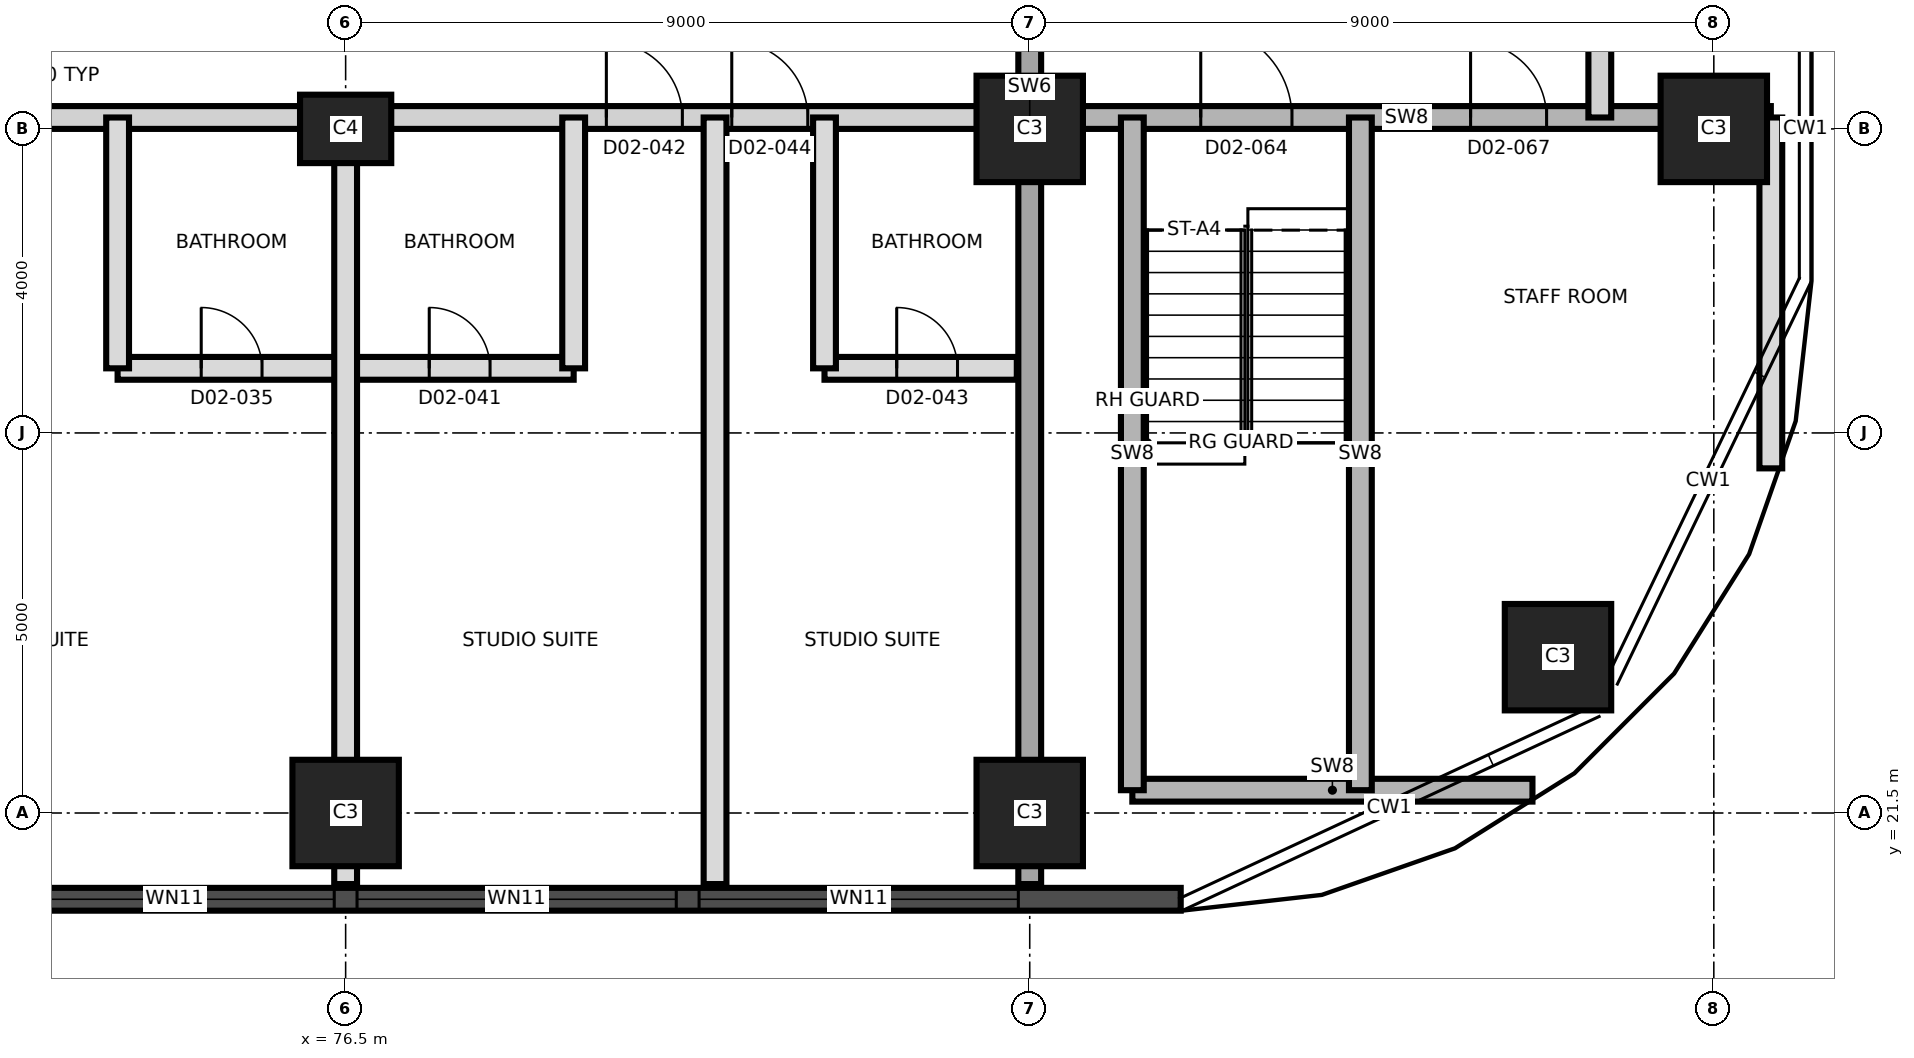
"""IFC4 building model, lengths in metres.
Left out: names, types, materials, properties, quantities, classifications, styles, units other than length and angle.
Written with IfcOpenShell. Run it as: python <this file> out.ifc"""

import sys

from ifc_helpers import new_model, si_unit, direction, frame, frame_2d, origin, origin_2d, place, context, subcontext, project, spatial, rectangle, extrude, element, fill, save


model = new_model("IFC4")
c1 = context("Model", 3, precision=1e-05, world=origin(), true_north=direction((0.0, 1.0)))
c2 = subcontext(c1, "Body", "Model", "MODEL_VIEW")
j1 = project(units=[si_unit("LENGTHUNIT", "METRE"), si_unit("PLANEANGLEUNIT", "RADIAN")], contexts=[c1])
p1 = place(None, origin())
s1 = spatial("IfcSite", under=j1, at=p1, CompositionType="ELEMENT")
p2 = place(p1, origin())
s2 = spatial("IfcBuilding", under=s1, at=p2, CompositionType="ELEMENT")
p3 = place(p2, frame((0.0, 0.0, 44.6)))
s3 = spatial("IfcBuildingStorey", under=s2, at=p3, CompositionType="ELEMENT", Elevation=44.6)
for number, where, z_axis, x_axis in (
    (1, (76.5, 21.5, 0.0), (0.0, 0.0, 1.0), (1.0, 0.0, 0.0)),
    (2, (85.5, 21.5, 0.0), (0.0, 0.0, 1.0), (1.0, 0.0, 0.0)),
    (3, (92.45, 23.55, 0.0), (0.0, 0.0, 1.0), (1.0, 0.0, 0.0)),
):
    element("IfcColumn", number, at=place(p3, frame(where, z_axis=z_axis, x_axis=x_axis)), inside=s3, PredefinedType="COLUMN", context=c2, shape_type="SweptSolid", body=[
        extrude(rectangle(XDim=1.4, YDim=1.4, at=origin_2d()), origin(), (0.0, 0.0, 1.0), 3.7),
    ])
p4 = place(p3, frame((76.5, 30.5, 0.0), z_axis=(0.0, 0.0, 1.0), x_axis=(1.0, 0.0, 0.0)))
e4 = element("IfcColumn", 4, at=p4, inside=s3, PredefinedType="COLUMN", context=c2, shape_type="SweptSolid", body=[
    extrude(rectangle(XDim=1.2, YDim=0.9, at=origin_2d()), origin(), (0.0, 0.0, 1.0), 3.7),
])
for number, where, z_axis, x_axis in (
    (5, (85.5, 30.5, 0.0), (0.0, 0.0, 1.0), (1.0, 0.0, 0.0)),
    (6, (94.5, 30.5, 0.0), (0.0, 0.0, 1.0), (1.0, 0.0, 0.0)),
):
    element("IfcColumn", number, at=place(p3, frame(where, z_axis=z_axis, x_axis=x_axis)), inside=s3, PredefinedType="COLUMN", context=c2, shape_type="SweptSolid", body=[
        extrude(rectangle(XDim=1.4, YDim=1.4, at=origin_2d()), origin(), (0.0, 0.0, 1.0), 3.7),
    ])
p5 = place(p3, frame((85.5, 20.565, 0.0), z_axis=(0.0, 0.0, 1.0), x_axis=(0.0, 1.0, 0.0)))
e7 = element("IfcWall", 7, at=p5, inside=s3, PredefinedType="SHEAR", context=c2, shape_type="SweptSolid", body=[
    extrude(rectangle(XDim=19.87, YDim=0.3, at=frame_2d((9.935, 0.0))), origin(), (0.0, 0.0, 1.0), 3.7),
])
p6 = place(p5, frame((11.135, 0.0, 0.0)))
e8 = element("IfcOpeningElement", 8, at=p6, cuts=e7, PredefinedType="OPENING", context=c2, shape_type="SweptSolid", body=[
    extrude(rectangle(XDim=1.4, YDim=2.1, at=frame_2d((0.7, 1.05))), frame((0.0, 0.16, 0.0), z_axis=(0.0, -1.0, 0.0), x_axis=(1.0, 0.0, 0.0)), (0.0, 0.0, 1.0), 0.32),
])
p7 = place(p3, frame((44.021, 20.365, 0.0), z_axis=(0.0, 0.0, 1.0), x_axis=(1.0, 0.0, 0.0)))
e9 = element("IfcWall", 9, at=p7, inside=s3, PredefinedType="SOLIDWALL", context=c2, shape_type="SweptSolid", body=[
    extrude(rectangle(XDim=43.466, YDim=0.3, at=frame_2d((21.733, 0.0))), origin(), (0.0, 0.0, 1.0), 3.4),
])
p8 = place(p7, frame((1.84, 0.0, 0.3)))
e10 = element("IfcOpeningElement", 10, at=p8, cuts=e9, PredefinedType="OPENING", context=c2, shape_type="SweptSolid", body=[
    extrude(rectangle(XDim=1.8, YDim=2.4, at=frame_2d((0.9, 1.2))), frame((0.0, 0.16, 0.0), z_axis=(0.0, -1.0, 0.0), x_axis=(1.0, 0.0, 0.0)), (0.0, 0.0, 1.0), 0.32),
])
p9 = place(p7, frame((5.63, 0.0, 0.9)))
e11 = element("IfcOpeningElement", 11, at=p9, cuts=e9, PredefinedType="OPENING", context=c2, shape_type="SweptSolid", body=[
    extrude(rectangle(XDim=4.2, YDim=1.5, at=frame_2d((2.1, 0.75))), frame((0.0, 0.16, 0.0), z_axis=(0.0, -1.0, 0.0), x_axis=(1.0, 0.0, 0.0)), (0.0, 0.0, 1.0), 0.32),
])
p10 = place(p7, frame((10.13, 0.0, 0.9)))
e12 = element("IfcOpeningElement", 12, at=p10, cuts=e9, PredefinedType="OPENING", context=c2, shape_type="SweptSolid", body=[
    extrude(rectangle(XDim=4.2, YDim=1.5, at=frame_2d((2.1, 0.75))), frame((0.0, 0.16, 0.0), z_axis=(0.0, -1.0, 0.0), x_axis=(1.0, 0.0, 0.0)), (0.0, 0.0, 1.0), 0.32),
])
p11 = place(p7, frame((14.63, 0.0, 0.9)))
e13 = element("IfcOpeningElement", 13, at=p11, cuts=e9, PredefinedType="OPENING", context=c2, shape_type="SweptSolid", body=[
    extrude(rectangle(XDim=4.2, YDim=1.5, at=frame_2d((2.1, 0.75))), frame((0.0, 0.16, 0.0), z_axis=(0.0, -1.0, 0.0), x_axis=(1.0, 0.0, 0.0)), (0.0, 0.0, 1.0), 0.32),
])
p12 = place(p7, frame((19.13, 0.0, 0.9)))
e14 = element("IfcOpeningElement", 14, at=p12, cuts=e9, PredefinedType="OPENING", context=c2, shape_type="SweptSolid", body=[
    extrude(rectangle(XDim=4.2, YDim=1.5, at=frame_2d((2.1, 0.75))), frame((0.0, 0.16, 0.0), z_axis=(0.0, -1.0, 0.0), x_axis=(1.0, 0.0, 0.0)), (0.0, 0.0, 1.0), 0.32),
])
p13 = place(p7, frame((23.63, 0.0, 0.9)))
e15 = element("IfcOpeningElement", 15, at=p13, cuts=e9, PredefinedType="OPENING", context=c2, shape_type="SweptSolid", body=[
    extrude(rectangle(XDim=4.2, YDim=1.5, at=frame_2d((2.1, 0.75))), frame((0.0, 0.16, 0.0), z_axis=(0.0, -1.0, 0.0), x_axis=(1.0, 0.0, 0.0)), (0.0, 0.0, 1.0), 0.32),
])
p14 = place(p7, frame((28.13, 0.0, 0.9)))
e16 = element("IfcOpeningElement", 16, at=p14, cuts=e9, PredefinedType="OPENING", context=c2, shape_type="SweptSolid", body=[
    extrude(rectangle(XDim=4.2, YDim=1.5, at=frame_2d((2.1, 0.75))), frame((0.0, 0.16, 0.0), z_axis=(0.0, -1.0, 0.0), x_axis=(1.0, 0.0, 0.0)), (0.0, 0.0, 1.0), 0.32),
])
p15 = place(p7, frame((32.63, 0.0, 0.9)))
e17 = element("IfcOpeningElement", 17, at=p15, cuts=e9, PredefinedType="OPENING", context=c2, shape_type="SweptSolid", body=[
    extrude(rectangle(XDim=4.2, YDim=1.5, at=frame_2d((2.1, 0.75))), frame((0.0, 0.16, 0.0), z_axis=(0.0, -1.0, 0.0), x_axis=(1.0, 0.0, 0.0)), (0.0, 0.0, 1.0), 0.32),
])
p16 = place(p7, frame((37.13, 0.0, 0.9)))
e18 = element("IfcOpeningElement", 18, at=p16, cuts=e9, PredefinedType="OPENING", context=c2, shape_type="SweptSolid", body=[
    extrude(rectangle(XDim=4.2, YDim=1.5, at=frame_2d((2.1, 0.75))), frame((0.0, 0.16, 0.0), z_axis=(0.0, -1.0, 0.0), x_axis=(1.0, 0.0, 0.0)), (0.0, 0.0, 1.0), 0.32),
])
p17 = place(p3, frame((86.85, 21.8, 0.0), z_axis=(0.0, 0.0, 1.0), x_axis=(1.0, 0.0, 0.0)))
e19 = element("IfcWall", 19, at=p17, inside=s3, PredefinedType="SHEAR", context=c2, shape_type="SweptSolid", body=[
    extrude(rectangle(XDim=5.264, YDim=0.3, at=frame_2d((2.632, 0.0))), origin(), (0.0, 0.0, 1.0), 3.4),
])
p18 = place(p3, frame((73.5, 27.35, 0.0), z_axis=(0.0, 0.0, 1.0), x_axis=(1.0, 0.0, 0.0)))
e20 = element("IfcWall", 20, at=p18, inside=s3, PredefinedType="PARTITIONING", context=c2, shape_type="SweptSolid", body=[
    extrude(rectangle(XDim=6.0, YDim=0.3, at=frame_2d((3.0, 0.0))), origin(), (0.0, 0.0, 1.0), 3.4),
])
p19 = place(p18, frame((1.1, 0.0, 0.0)))
e21 = element("IfcOpeningElement", 21, at=p19, cuts=e20, PredefinedType="OPENING", context=c2, shape_type="SweptSolid", body=[
    extrude(rectangle(XDim=0.8, YDim=2.1, at=frame_2d((0.4, 1.05))), frame((0.0, 0.16, 0.0), z_axis=(0.0, -1.0, 0.0), x_axis=(1.0, 0.0, 0.0)), (0.0, 0.0, 1.0), 0.32),
])
p20 = place(p18, frame((4.1, 0.0, 0.0)))
e22 = element("IfcOpeningElement", 22, at=p20, cuts=e20, PredefinedType="OPENING", context=c2, shape_type="SweptSolid", body=[
    extrude(rectangle(XDim=0.8, YDim=2.1, at=frame_2d((0.4, 1.05))), frame((0.0, 0.16, 0.0), z_axis=(0.0, -1.0, 0.0), x_axis=(1.0, 0.0, 0.0)), (0.0, 0.0, 1.0), 0.32),
])
p21 = place(p3, frame((82.8, 27.35, 0.0), z_axis=(0.0, 0.0, 1.0), x_axis=(1.0, 0.0, 0.0)))
e23 = element("IfcWall", 23, at=p21, inside=s3, PredefinedType="PARTITIONING", context=c2, shape_type="SweptSolid", body=[
    extrude(rectangle(XDim=2.53, YDim=0.3, at=frame_2d((1.265, 0.0))), origin(), (0.0, 0.0, 1.0), 3.4),
])
p22 = place(p21, frame((0.95, 0.0, 0.0)))
e24 = element("IfcOpeningElement", 24, at=p22, cuts=e23, PredefinedType="OPENING", context=c2, shape_type="SweptSolid", body=[
    extrude(rectangle(XDim=0.8, YDim=2.1, at=frame_2d((0.4, 1.05))), frame((0.0, 0.16, 0.0), z_axis=(0.0, -1.0, 0.0), x_axis=(1.0, 0.0, 0.0)), (0.0, 0.0, 1.0), 0.32),
])
p23 = place(p3, frame((58.95, 30.65, 0.0), z_axis=(0.0, 0.0, 1.0), x_axis=(1.0, 0.0, 0.0)))
e25 = element("IfcWall", 25, at=p23, inside=s3, PredefinedType="PARTITIONING", context=c2, shape_type="SweptSolid", body=[
    extrude(rectangle(XDim=26.38, YDim=0.3, at=frame_2d((13.19, 0.0))), origin(), (0.0, 0.0, 1.0), 3.4),
])
p24 = place(p23, frame((0.685, 0.0, 0.0)))
e26 = element("IfcOpeningElement", 26, at=p24, cuts=e25, PredefinedType="OPENING", context=c2, shape_type="SweptSolid", body=[
    extrude(rectangle(XDim=1.2, YDim=2.1, at=frame_2d((0.6, 1.05))), frame((0.0, 0.16, 0.0), z_axis=(0.0, -1.0, 0.0), x_axis=(1.0, 0.0, 0.0)), (0.0, 0.0, 1.0), 0.32),
])
p25 = place(p23, frame((3.935, 0.0, 0.0)))
e27 = element("IfcOpeningElement", 27, at=p25, cuts=e25, PredefinedType="OPENING", context=c2, shape_type="SweptSolid", body=[
    extrude(rectangle(XDim=1.0, YDim=2.1, at=frame_2d((0.5, 1.05))), frame((0.0, 0.16, 0.0), z_axis=(0.0, -1.0, 0.0), x_axis=(1.0, 0.0, 0.0)), (0.0, 0.0, 1.0), 0.32),
])
p26 = place(p23, frame((12.55, 0.0, 0.0)))
e28 = element("IfcOpeningElement", 28, at=p26, cuts=e25, PredefinedType="OPENING", context=c2, shape_type="SweptSolid", body=[
    extrude(rectangle(XDim=1.0, YDim=2.4, at=frame_2d((0.5, 1.2))), frame((0.0, 0.16, 0.0), z_axis=(0.0, -1.0, 0.0), x_axis=(1.0, 0.0, 0.0)), (0.0, 0.0, 1.0), 0.32),
])
p27 = place(p23, frame((20.98, 0.0, 0.0)))
e29 = element("IfcOpeningElement", 29, at=p27, cuts=e25, PredefinedType="OPENING", context=c2, shape_type="SweptSolid", body=[
    extrude(rectangle(XDim=1.0, YDim=2.4, at=frame_2d((0.5, 1.2))), frame((0.0, 0.16, 0.0), z_axis=(0.0, -1.0, 0.0), x_axis=(1.0, 0.0, 0.0)), (0.0, 0.0, 1.0), 0.32),
])
p28 = place(p23, frame((22.63, 0.0, 0.0)))
e30 = element("IfcOpeningElement", 30, at=p28, cuts=e25, PredefinedType="OPENING", context=c2, shape_type="SweptSolid", body=[
    extrude(rectangle(XDim=1.0, YDim=2.4, at=frame_2d((0.5, 1.2))), frame((0.0, 0.16, 0.0), z_axis=(0.0, -1.0, 0.0), x_axis=(1.0, 0.0, 0.0)), (0.0, 0.0, 1.0), 0.32),
])
p29 = place(p3, frame((85.67, 30.65, 0.0), z_axis=(0.0, 0.0, 1.0), x_axis=(1.0, 0.0, 0.0)))
e31 = element("IfcWall", 31, at=p29, inside=s3, PredefinedType="SHEAR", context=c2, shape_type="SweptSolid", body=[
    extrude(rectangle(XDim=9.58, YDim=0.3, at=frame_2d((4.79, 0.0))), origin(), (0.0, 0.0, 1.0), 3.4),
])
p30 = place(p29, frame((2.08, 0.0, 0.0)))
e32 = element("IfcOpeningElement", 32, at=p30, cuts=e31, PredefinedType="OPENING", context=c2, shape_type="SweptSolid", body=[
    extrude(rectangle(XDim=1.2, YDim=2.1, at=frame_2d((0.6, 1.05))), frame((0.0, 0.16, 0.0), z_axis=(0.0, -1.0, 0.0), x_axis=(1.0, 0.0, 0.0)), (0.0, 0.0, 1.0), 0.32),
])
p31 = place(p29, frame((5.63, 0.0, 0.0)))
e33 = element("IfcOpeningElement", 33, at=p31, cuts=e31, PredefinedType="OPENING", context=c2, shape_type="SweptSolid", body=[
    extrude(rectangle(XDim=1.0, YDim=2.1, at=frame_2d((0.5, 1.05))), frame((0.0, 0.16, 0.0), z_axis=(0.0, -1.0, 0.0), x_axis=(1.0, 0.0, 0.0)), (0.0, 0.0, 1.0), 0.32),
])
p32 = place(p3, frame((73.5, 27.35, 0.0), z_axis=(0.0, 0.0, 1.0), x_axis=(0.0, 1.0, 0.0)))
e34 = element("IfcWall", 34, at=p32, inside=s3, PredefinedType="PARTITIONING", context=c2, shape_type="SweptSolid", body=[
    extrude(rectangle(XDim=3.3, YDim=0.3, at=frame_2d((1.65, 0.0))), origin(), (0.0, 0.0, 1.0), 3.4),
])
p33 = place(p3, frame((76.5, 20.565, 0.0), z_axis=(0.0, 0.0, 1.0), x_axis=(0.0, 1.0, 0.0)))
e35 = element("IfcWall", 35, at=p33, inside=s3, PredefinedType="PARTITIONING", context=c2, shape_type="SweptSolid", body=[
    extrude(rectangle(XDim=10.085, YDim=0.3, at=frame_2d((5.042, 0.0))), origin(), (0.0, 0.0, 1.0), 3.4),
])
p34 = place(p3, frame((79.5, 27.35, 0.0), z_axis=(0.0, 0.0, 1.0), x_axis=(0.0, 1.0, 0.0)))
e36 = element("IfcWall", 36, at=p34, inside=s3, PredefinedType="PARTITIONING", context=c2, shape_type="SweptSolid", body=[
    extrude(rectangle(XDim=3.3, YDim=0.3, at=frame_2d((1.65, 0.0))), origin(), (0.0, 0.0, 1.0), 3.4),
])
p35 = place(p3, frame((81.36, 20.565, 0.0), z_axis=(0.0, 0.0, 1.0), x_axis=(0.0, 1.0, 0.0)))
e37 = element("IfcWall", 37, at=p35, inside=s3, PredefinedType="PARTITIONING", context=c2, shape_type="SweptSolid", body=[
    extrude(rectangle(XDim=10.085, YDim=0.3, at=frame_2d((5.042, 0.0))), origin(), (0.0, 0.0, 1.0), 3.4),
])
p36 = place(p3, frame((82.8, 27.35, 0.0), z_axis=(0.0, 0.0, 1.0), x_axis=(0.0, 1.0, 0.0)))
e38 = element("IfcWall", 38, at=p36, inside=s3, PredefinedType="PARTITIONING", context=c2, shape_type="SweptSolid", body=[
    extrude(rectangle(XDim=3.3, YDim=0.3, at=frame_2d((1.65, 0.0))), origin(), (0.0, 0.0, 1.0), 3.4),
])
for number, where, z_axis, x_axis in (
    (39, (86.85, 21.8, 0.0), (0.0, 0.0, 1.0), (0.0, 1.0, 0.0)),
    (40, (89.85, 21.8, 0.0), (0.0, 0.0, 1.0), (0.0, 1.0, 0.0)),
):
    element("IfcWall", number, at=place(p3, frame(where, z_axis=z_axis, x_axis=x_axis)), inside=s3, PredefinedType="SHEAR", context=c2, shape_type="SweptSolid", body=[
        extrude(rectangle(XDim=8.85, YDim=0.3, at=frame_2d((4.425, 0.0))), origin(), (0.0, 0.0, 1.0), 3.4),
    ])
p37 = place(p3, frame((93.0, 30.65, 0.0), z_axis=(0.0, 0.0, 1.0), x_axis=(0.0, 1.0, 0.0)))
e41 = element("IfcWall", 41, at=p37, inside=s3, PredefinedType="PARTITIONING", context=c2, shape_type="SweptSolid", body=[
    extrude(rectangle(XDim=2.7, YDim=0.3, at=frame_2d((1.35, 0.0))), origin(), (0.0, 0.0, 1.0), 3.4),
])
p38 = place(p3, frame((95.25, 26.034, 0.0), z_axis=(0.0, 0.0, 1.0), x_axis=(0.0, 1.0, 0.0)))
e42 = element("IfcWall", 42, at=p38, inside=s3, PredefinedType="PARTITIONING", context=c2, shape_type="SweptSolid", body=[
    extrude(rectangle(XDim=4.616, YDim=0.3, at=frame_2d((2.308, 0.0))), origin(), (0.0, 0.0, 1.0), 3.4),
])
p39 = place(p14, origin())
e43 = element("IfcWindow", 43, at=p39, inside=s3, PartitioningType="SINGLE_PANEL", PredefinedType="WINDOW", context=c2, shape_type="SweptSolid", body=[
    extrude(rectangle(XDim=4.2, YDim=1.5, at=frame_2d((2.1, 0.75))), frame((0.0, 0.03, 0.0), z_axis=(0.0, -1.0, 0.0), x_axis=(1.0, 0.0, 0.0)), (0.0, 0.0, 1.0), 0.06),
])
fill(e16, e43)
p40 = place(p15, origin())
e44 = element("IfcWindow", 44, at=p40, inside=s3, PartitioningType="SINGLE_PANEL", PredefinedType="WINDOW", context=c2, shape_type="SweptSolid", body=[
    extrude(rectangle(XDim=4.2, YDim=1.5, at=frame_2d((2.1, 0.75))), frame((0.0, 0.03, 0.0), z_axis=(0.0, -1.0, 0.0), x_axis=(1.0, 0.0, 0.0)), (0.0, 0.0, 1.0), 0.06),
])
fill(e17, e44)
p41 = place(p16, origin())
e45 = element("IfcWindow", 45, at=p41, inside=s3, PartitioningType="SINGLE_PANEL", PredefinedType="WINDOW", context=c2, shape_type="SweptSolid", body=[
    extrude(rectangle(XDim=4.2, YDim=1.5, at=frame_2d((2.1, 0.75))), frame((0.0, 0.03, 0.0), z_axis=(0.0, -1.0, 0.0), x_axis=(1.0, 0.0, 0.0)), (0.0, 0.0, 1.0), 0.06),
])
fill(e18, e45)
p42 = place(p19, origin())
e46 = element("IfcDoor", 46, at=p42, inside=s3, OperationType="SINGLE_SWING_LEFT", PredefinedType="DOOR", context=c2, shape_type="SweptSolid", body=[
    extrude(rectangle(XDim=0.8, YDim=2.1, at=frame_2d((0.4, 1.05))), frame((0.0, 0.025, 0.0), z_axis=(0.0, -1.0, 0.0), x_axis=(1.0, 0.0, 0.0)), (0.0, 0.0, 1.0), 0.05),
])
fill(e21, e46)
p43 = place(p20, origin())
e47 = element("IfcDoor", 47, at=p43, inside=s3, OperationType="SINGLE_SWING_LEFT", PredefinedType="DOOR", context=c2, shape_type="SweptSolid", body=[
    extrude(rectangle(XDim=0.8, YDim=2.1, at=frame_2d((0.4, 1.05))), frame((0.0, 0.025, 0.0), z_axis=(0.0, -1.0, 0.0), x_axis=(1.0, 0.0, 0.0)), (0.0, 0.0, 1.0), 0.05),
])
fill(e22, e47)
p44 = place(p27, origin())
e48 = element("IfcDoor", 48, at=p44, inside=s3, OperationType="SINGLE_SWING_LEFT", PredefinedType="DOOR", context=c2, shape_type="SweptSolid", body=[
    extrude(rectangle(XDim=1.0, YDim=2.4, at=frame_2d((0.5, 1.2))), frame((0.0, 0.025, 0.0), z_axis=(0.0, -1.0, 0.0), x_axis=(1.0, 0.0, 0.0)), (0.0, 0.0, 1.0), 0.05),
])
fill(e29, e48)
p45 = place(p22, origin())
e49 = element("IfcDoor", 49, at=p45, inside=s3, OperationType="SINGLE_SWING_LEFT", PredefinedType="DOOR", context=c2, shape_type="SweptSolid", body=[
    extrude(rectangle(XDim=0.8, YDim=2.1, at=frame_2d((0.4, 1.05))), frame((0.0, 0.025, 0.0), z_axis=(0.0, -1.0, 0.0), x_axis=(1.0, 0.0, 0.0)), (0.0, 0.0, 1.0), 0.05),
])
fill(e24, e49)
p46 = place(p28, origin())
e50 = element("IfcDoor", 50, at=p46, inside=s3, OperationType="SINGLE_SWING_RIGHT", PredefinedType="DOOR", context=c2, shape_type="SweptSolid", body=[
    extrude(rectangle(XDim=1.0, YDim=2.4, at=frame_2d((0.5, 1.2))), frame((0.0, 0.025, 0.0), z_axis=(0.0, -1.0, 0.0), x_axis=(1.0, 0.0, 0.0)), (0.0, 0.0, 1.0), 0.05),
])
fill(e30, e50)
p47 = place(p30, origin())
e51 = element("IfcDoor", 51, at=p47, inside=s3, OperationType="SINGLE_SWING_LEFT", PredefinedType="DOOR", context=c2, shape_type="SweptSolid", body=[
    extrude(rectangle(XDim=1.2, YDim=2.1, at=frame_2d((0.6, 1.05))), frame((0.0, 0.025, 0.0), z_axis=(0.0, -1.0, 0.0), x_axis=(1.0, 0.0, 0.0)), (0.0, 0.0, 1.0), 0.05),
])
fill(e32, e51)
p48 = place(p31, origin())
e52 = element("IfcDoor", 52, at=p48, inside=s3, OperationType="SINGLE_SWING_LEFT", PredefinedType="DOOR", context=c2, shape_type="SweptSolid", body=[
    extrude(rectangle(XDim=1.0, YDim=2.1, at=frame_2d((0.5, 1.05))), frame((0.0, 0.025, 0.0), z_axis=(0.0, -1.0, 0.0), x_axis=(1.0, 0.0, 0.0)), (0.0, 0.0, 1.0), 0.05),
])
fill(e33, e52)
save(model, sys.argv[1])
